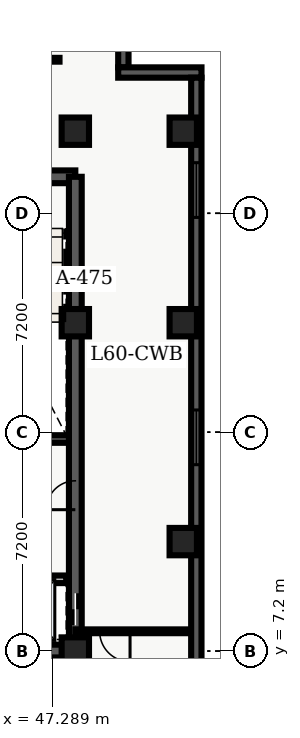
"""IFC4 building model, lengths in metres.
Left out: names, types, materials, properties, quantities, classifications, styles, units other than length and angle.
Written with IfcOpenShell. Run it as: python <this file> out.ifc"""

import sys

from ifc_helpers import new_model, entity, si_unit, converted_unit, direction, frame, origin_with_axes, origin_2d_with_axis, place, context, subcontext, project, spatial, polyline, rectangle, outline, extrude, element, fill, save


model = new_model("IFC4")
c1 = context("Model", 3, precision=1e-05, world=origin_with_axes(), true_north=direction((0.0, 1.0)))
c2 = subcontext(c1, "Body", "Model", "MODEL_VIEW")
j1 = project(units=[si_unit("LENGTHUNIT", "METRE"), converted_unit("PLANEANGLEUNIT", "DEGREE", entity("IfcPlaneAngleMeasure", 0.017), si_unit("PLANEANGLEUNIT", "RADIAN"), dimensions=[0, 0, 0, 0, 0, 0, 0])], contexts=[c1])
p1 = place(None, origin_with_axes())
s1 = spatial("IfcSite", under=j1, at=p1, CompositionType="ELEMENT")
p2 = place(p1, origin_with_axes())
s2 = spatial("IfcBuilding", under=s1, at=p2, CompositionType="ELEMENT")
p3 = place(p2, frame((0.0, 0.0, 244.2), z_axis=(0.0, 0.0, 1.0), x_axis=(1.0, 0.0, 0.0)))
s3 = spatial("IfcBuildingStorey", under=s2, at=p3, CompositionType="ELEMENT", Elevation=244.2)
p4 = place(p3, frame((40.2, 7.2, 0.0), z_axis=(0.0, 0.0, 1.0), x_axis=(1.0, 0.0, 0.0)))
e1 = element("IfcWall", 1, at=p4, inside=s3, PredefinedType="SHEAR", context=c2, shape_type="SweptSolid", body=[
    extrude(outline(polyline([(0.0, -0.21), (7.85, -0.21), (7.85, 0.21), (0.0, 0.21), (0.0, -0.21)])), origin_with_axes(), (0.0, 0.0, 1.0), 3.6),
])
p5 = place(p4, frame((2.175, 0.0, 0.0), z_axis=(0.0, 0.0, 1.0), x_axis=(1.0, 0.0, 0.0)))
e2 = element("IfcOpeningElement", 2, at=p5, cuts=e1, PredefinedType="OPENING", context=c2, shape_type="SweptSolid", body=[
    extrude(rectangle(XDim=1.05, YDim=0.44, at=origin_2d_with_axis()), origin_with_axes(), (0.0, 0.0, 1.0), 2.15),
])
p6 = place(p3, frame((40.2, 22.8, 0.0), z_axis=(0.0, 0.0, 1.0), x_axis=(1.0, 0.0, 0.0)))
e3 = element("IfcWall", 3, at=p6, inside=s3, PredefinedType="SHEAR", context=c2, shape_type="SweptSolid", body=[
    extrude(outline(polyline([(0.0, -0.21), (7.85, -0.21), (7.85, 0.21), (0.0, 0.21), (0.0, -0.21)])), origin_with_axes(), (0.0, 0.0, 1.0), 3.6),
])
p7 = place(p6, frame((5.775, 0.0, 0.0), z_axis=(0.0, 0.0, 1.0), x_axis=(1.0, 0.0, 0.0)))
e4 = element("IfcOpeningElement", 4, at=p7, cuts=e3, PredefinedType="OPENING", context=c2, shape_type="SweptSolid", body=[
    extrude(rectangle(XDim=1.05, YDim=0.44, at=origin_2d_with_axis()), origin_with_axes(), (0.0, 0.0, 1.0), 2.15),
])
p8 = place(p6, frame((2.15, 0.0, 0.0), z_axis=(0.0, 0.0, 1.0), x_axis=(1.0, 0.0, 0.0)))
e5 = element("IfcOpeningElement", 5, at=p8, cuts=e3, PredefinedType="OPENING", context=c2, shape_type="SweptSolid", body=[
    extrude(rectangle(XDim=0.9, YDim=0.44, at=origin_2d_with_axis()), origin_with_axes(), (0.0, 0.0, 1.0), 2.15),
])
p9 = place(p3, frame((48.05, 7.2, 0.0), z_axis=(0.0, 0.0, 1.0), x_axis=(0.0, 1.0, 0.0)))
e6 = element("IfcWall", 6, at=p9, inside=s3, PredefinedType="SHEAR", context=c2, shape_type="SweptSolid", body=[
    extrude(outline(polyline([(0.0, -0.21), (15.6, -0.21), (15.6, 0.21), (0.0, 0.21), (0.0, -0.21)])), origin_with_axes(), (0.0, 0.0, 1.0), 3.6),
])
p10 = place(p9, frame((1.375, 0.0, 0.0), z_axis=(0.0, 0.0, 1.0), x_axis=(1.0, 0.0, 0.0)))
e7 = element("IfcOpeningElement", 7, at=p10, cuts=e6, PredefinedType="OPENING", context=c2, shape_type="SweptSolid", body=[
    extrude(rectangle(XDim=1.05, YDim=0.44, at=origin_2d_with_axis()), origin_with_axes(), (0.0, 0.0, 1.0), 2.15),
])
p11 = place(p9, frame((5.125, 0.0, 0.0), z_axis=(0.0, 0.0, 1.0), x_axis=(1.0, 0.0, 0.0)))
e8 = element("IfcOpeningElement", 8, at=p11, cuts=e6, PredefinedType="OPENING", context=c2, shape_type="SweptSolid", body=[
    extrude(rectangle(XDim=0.95, YDim=0.44, at=origin_2d_with_axis()), origin_with_axes(), (0.0, 0.0, 1.0), 2.15),
])
p12 = place(p3, frame((44.25, 14.175, 0.0), z_axis=(0.0, 0.0, 1.0), x_axis=(1.0, 0.0, 0.0)))
e9 = element("IfcWall", 9, at=p12, inside=s3, PredefinedType="SHEAR", context=c2, shape_type="SweptSolid", body=[
    extrude(outline(polyline([(0.0, -0.125), (3.59, -0.125), (3.59, 0.125), (0.0, 0.125), (0.0, -0.125)])), origin_with_axes(), (0.0, 0.0, 1.0), 3.6),
])
for number, where, z_axis, x_axis in (
    (10, (48.05, 7.2, 0.0), (0.0, 0.0, 1.0), (1.0, 0.0, 0.0)),
    (11, (48.05, 18.0, 0.0), (0.0, 0.0, 1.0), (1.0, 0.0, 0.0)),
    (12, (48.05, 24.3, 0.0), (0.0, 0.0, 1.0), (1.0, 0.0, 0.0)),
    (13, (51.6, 10.8, 0.0), (0.0, 0.0, 1.0), (1.0, 0.0, 0.0)),
    (14, (51.6, 18.0, 0.0), (0.0, 0.0, 1.0), (1.0, 0.0, 0.0)),
    (15, (51.6, 24.3, 0.0), (0.0, 0.0, 1.0), (1.0, 0.0, 0.0)),
):
    element("IfcColumn", number, at=place(p3, frame(where, z_axis=z_axis, x_axis=x_axis)), inside=s3, PredefinedType="COLUMN", context=c2, shape_type="SweptSolid", body=[
        extrude(rectangle(XDim=0.9, YDim=0.9, at=origin_2d_with_axis()), origin_with_axes(), (0.0, 0.0, 1.0), 3.9),
    ])
p13 = place(p3, frame((44.25, 9.56, 0.0), z_axis=(0.0, 0.0, 1.0), x_axis=(1.0, 0.0, 0.0)))
e16 = element("IfcWall", 16, at=p13, inside=s3, PredefinedType="SOLIDWALL", context=c2, shape_type="SweptSolid", body=[
    extrude(outline(polyline([(0.0, -0.125), (3.5, -0.125), (3.5, 0.125), (0.0, 0.125), (0.0, -0.125)])), origin_with_axes(), (0.0, 0.0, 1.0), 2.64),
])
p14 = place(p3, frame((51.865, 7.85, 0.0), z_axis=(0.0, 0.0, 1.0), x_axis=(-1.0, 0.0, 0.0)))
e17 = element("IfcWall", 17, at=p14, inside=s3, PredefinedType="PARTITIONING", context=c2, shape_type="SweptSolid", body=[
    extrude(outline(polyline([(0.0, -0.062), (3.815, -0.062), (3.815, 0.062), (0.0, 0.062), (0.0, -0.062)])), origin_with_axes(), (0.0, 0.0, 1.0), 2.64),
])
p15 = place(p14, frame((2.515, 0.0, 0.0), z_axis=(0.0, 0.0, 1.0), x_axis=(1.0, 0.0, 0.0)))
e18 = element("IfcOpeningElement", 18, at=p15, cuts=e17, PredefinedType="OPENING", context=c2, shape_type="SweptSolid", body=[
    extrude(rectangle(XDim=1.0, YDim=0.145, at=origin_2d_with_axis()), origin_with_axes(), (0.0, 0.0, 1.0), 2.15),
])
p16 = place(p3, frame((36.335, 26.65, 0.0), z_axis=(0.0, 0.0, 1.0), x_axis=(1.0, 0.0, 0.0)))
e19 = element("IfcWall", 19, at=p16, inside=s3, PredefinedType="PARTITIONING", context=c2, shape_type="SweptSolid", body=[
    extrude(outline(polyline([(0.0, -0.062), (11.195, -0.062), (11.195, 0.062), (0.0, 0.062), (0.0, -0.062)])), origin_with_axes(), (0.0, 0.0, 1.0), 2.64),
])
p17 = place(p16, frame((6.665, 0.0, 0.0), z_axis=(0.0, 0.0, 1.0), x_axis=(1.0, 0.0, 0.0)))
e20 = element("IfcOpeningElement", 20, at=p17, cuts=e19, PredefinedType="OPENING", context=c2, shape_type="SweptSolid", body=[
    extrude(rectangle(XDim=1.0, YDim=0.145, at=origin_2d_with_axis()), origin_with_axes(), (0.0, 0.0, 1.0), 2.15),
])
p18 = place(p3, frame((49.63, 28.46, 0.0), z_axis=(0.0, 0.0, 1.0), x_axis=(0.0, -1.0, 0.0)))
e21 = element("IfcWall", 21, at=p18, inside=s3, PredefinedType="SOLIDWALL", context=c2, shape_type="SweptSolid", body=[
    extrude(outline(polyline([(0.0, -0.17), (2.06, -0.17), (2.06, 0.17), (0.0, 0.17), (0.0, -0.17)])), origin_with_axes(), (0.0, 0.0, 1.0), 3.6),
])
p19 = place(p3, frame((49.46, 26.23, 0.0), z_axis=(0.0, 0.0, 1.0), x_axis=(1.0, 0.0, 0.0)))
e22 = element("IfcWall", 22, at=p19, inside=s3, PredefinedType="SOLIDWALL", context=c2, shape_type="SweptSolid", body=[
    extrude(outline(polyline([(0.0, -0.17), (2.74, -0.17), (2.74, 0.17), (0.0, 0.17), (0.0, -0.17)])), origin_with_axes(), (0.0, 0.0, 1.0), 3.6),
])
p20 = place(p3, frame((52.03, 26.06, 0.0), z_axis=(0.0, 0.0, 1.0), x_axis=(0.0, -1.0, 0.0)))
e23 = element("IfcWall", 23, at=p20, inside=s3, PredefinedType="SOLIDWALL", context=c2, shape_type="SweptSolid", body=[
    extrude(outline(polyline([(0.0, -0.17), (23.66, -0.17), (23.66, 0.17), (0.0, 0.17), (0.0, -0.17)])), origin_with_axes(), (0.0, 0.0, 1.0), 3.6),
])
p21 = place(p20, frame((3.696, 0.0, 0.45), z_axis=(0.0, 0.0, 1.0), x_axis=(1.0, 0.0, 0.0)))
e24 = element("IfcOpeningElement", 24, at=p21, cuts=e23, PredefinedType="OPENING", context=c2, shape_type="SweptSolid", body=[
    extrude(rectangle(XDim=1.8, YDim=0.36, at=origin_2d_with_axis()), origin_with_axes(), (0.0, 0.0, 1.0), 2.1),
])
p22 = place(p20, frame((11.83, 0.0, 0.45), z_axis=(0.0, 0.0, 1.0), x_axis=(1.0, 0.0, 0.0)))
e25 = element("IfcOpeningElement", 25, at=p22, cuts=e23, PredefinedType="OPENING", context=c2, shape_type="SweptSolid", body=[
    extrude(rectangle(XDim=1.8, YDim=0.36, at=origin_2d_with_axis()), origin_with_axes(), (0.0, 0.0, 1.0), 2.1),
])
p23 = place(p20, frame((20.364, 0.0, 0.45), z_axis=(0.0, 0.0, 1.0), x_axis=(1.0, 0.0, 0.0)))
e26 = element("IfcOpeningElement", 26, at=p23, cuts=e23, PredefinedType="OPENING", context=c2, shape_type="SweptSolid", body=[
    extrude(rectangle(XDim=1.8, YDim=0.36, at=origin_2d_with_axis()), origin_with_axes(), (0.0, 0.0, 1.0), 2.1),
])
p24 = place(p9, frame((1.375, 0.0, 0.0), z_axis=(0.0, 0.0, 1.0), x_axis=(1.0, 0.0, 0.0)))
e27 = element("IfcDoor", 27, at=p24, inside=s3, OperationType="SLIDING_TO_LEFT", PredefinedType="DOOR", context=c2, shape_type="SweptSolid", body=[
    extrude(rectangle(XDim=1.05, YDim=0.09, at=origin_2d_with_axis()), origin_with_axes(), (0.0, 0.0, 1.0), 2.15),
])
fill(e7, e27)
p25 = place(p9, frame((5.125, 0.0, 0.0), z_axis=(0.0, 0.0, 1.0), x_axis=(1.0, 0.0, 0.0)))
e28 = element("IfcDoor", 28, at=p25, inside=s3, OperationType="SINGLE_SWING_LEFT", PredefinedType="DOOR", context=c2, shape_type="SweptSolid", body=[
    extrude(rectangle(XDim=0.95, YDim=0.09, at=origin_2d_with_axis()), origin_with_axes(), (0.0, 0.0, 1.0), 2.15),
])
fill(e8, e28)
p26 = place(p14, frame((2.515, 0.0, 0.0), z_axis=(0.0, 0.0, 1.0), x_axis=(1.0, 0.0, 0.0)))
e29 = element("IfcDoor", 29, at=p26, inside=s3, OperationType="SINGLE_SWING_LEFT", PredefinedType="DOOR", context=c2, shape_type="SweptSolid", body=[
    extrude(rectangle(XDim=1.0, YDim=0.075, at=origin_2d_with_axis()), origin_with_axes(), (0.0, 0.0, 1.0), 2.15),
])
fill(e18, e29)
p27 = place(p20, frame((3.696, 0.0, 0.45), z_axis=(0.0, 0.0, 1.0), x_axis=(1.0, 0.0, 0.0)))
e30 = element("IfcWindow", 30, at=p27, inside=s3, PredefinedType="WINDOW", context=c2, shape_type="SweptSolid", body=[
    extrude(rectangle(XDim=1.8, YDim=0.09, at=origin_2d_with_axis()), origin_with_axes(), (0.0, 0.0, 1.0), 2.1),
])
fill(e24, e30)
p28 = place(p20, frame((11.83, 0.0, 0.45), z_axis=(0.0, 0.0, 1.0), x_axis=(1.0, 0.0, 0.0)))
e31 = element("IfcWindow", 31, at=p28, inside=s3, PredefinedType="WINDOW", context=c2, shape_type="SweptSolid", body=[
    extrude(rectangle(XDim=1.8, YDim=0.09, at=origin_2d_with_axis()), origin_with_axes(), (0.0, 0.0, 1.0), 2.1),
])
fill(e25, e31)
save(model, sys.argv[1])
